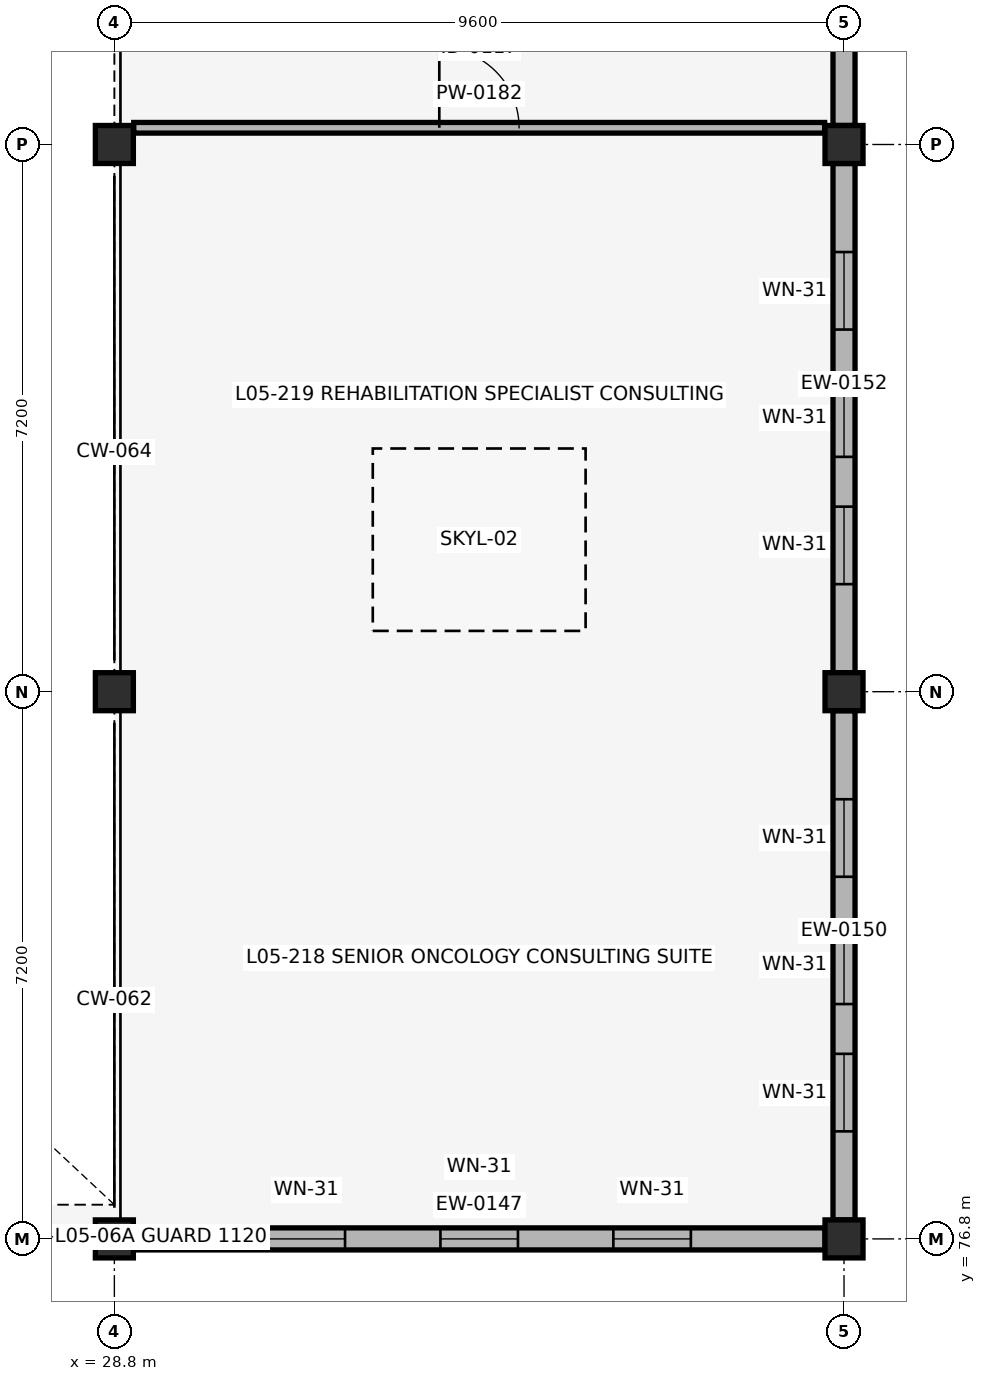
"""IFC4 building model, lengths in metres.
Left out: names, types, materials, properties, quantities, classifications, styles, units other than length and angle.
Written with IfcOpenShell. Run it as: python <this file> out.ifc"""

import sys

from ifc_helpers import new_model, si_unit, direction, frame, frame_2d, origin, origin_2d, place, context, subcontext, project, spatial, rectangle, extrude, element, fill, save


model = new_model("IFC4")
c1 = context("Model", 3, precision=1e-05, world=origin(), true_north=direction((0.0, 1.0)))
c2 = subcontext(c1, "Body", "Model", "MODEL_VIEW")
j1 = project(units=[si_unit("LENGTHUNIT", "METRE"), si_unit("PLANEANGLEUNIT", "RADIAN")], contexts=[c1])
p1 = place(None, origin())
s1 = spatial("IfcSite", under=j1, at=p1, CompositionType="ELEMENT")
p2 = place(p1, origin())
s2 = spatial("IfcBuilding", under=s1, at=p2, CompositionType="ELEMENT")
p3 = place(p2, frame((0.0, 0.0, 20.74)))
s3 = spatial("IfcBuildingStorey", under=s2, at=p3, CompositionType="ELEMENT", Elevation=20.74)
for number, where, z_axis, x_axis in (
    (1, (28.8, 76.8, 0.0), (0.0, 0.0, 1.0), (1.0, 0.0, 0.0)),
    (2, (28.8, 84.0, 0.0), (0.0, 0.0, 1.0), (1.0, 0.0, 0.0)),
    (3, (28.8, 91.2, 0.0), (0.0, 0.0, 1.0), (1.0, 0.0, 0.0)),
    (4, (38.4, 76.8, 0.0), (0.0, 0.0, 1.0), (1.0, 0.0, 0.0)),
    (5, (38.4, 84.0, 0.0), (0.0, 0.0, 1.0), (1.0, 0.0, 0.0)),
    (6, (38.4, 91.2, 0.0), (0.0, 0.0, 1.0), (1.0, 0.0, 0.0)),
):
    element("IfcColumn", number, at=place(p3, frame(where, z_axis=z_axis, x_axis=x_axis)), inside=s3, PredefinedType="COLUMN", context=c2, shape_type="SweptSolid", body=[
        extrude(rectangle(XDim=0.5, YDim=0.5, at=origin_2d()), origin(), (0.0, 0.0, 1.0), 4.08),
    ])
p4 = place(p3, frame((29.05, 76.8, 0.0), z_axis=(0.0, 0.0, 1.0), x_axis=(1.0, 0.0, 0.0)))
e7 = element("IfcWall", 7, at=p4, inside=s3, PredefinedType="SOLIDWALL", context=c2, shape_type="SweptSolid", body=[
    extrude(rectangle(XDim=9.1, YDim=0.29, at=frame_2d((4.55, 0.0))), origin(), (0.0, 0.0, 1.0), 3.07),
])
p5 = place(p4, frame((1.765, 0.0, 0.88)))
e8 = element("IfcOpeningElement", 8, at=p5, cuts=e7, PredefinedType="OPENING", context=c2, shape_type="SweptSolid", body=[
    extrude(rectangle(XDim=1.02, YDim=1.88, at=frame_2d((0.51, 0.94))), frame((0.0, 0.155, 0.0), z_axis=(0.0, -1.0, 0.0), x_axis=(1.0, 0.0, 0.0)), (0.0, 0.0, 1.0), 0.31),
])
p6 = place(p4, frame((4.04, 0.0, 0.88)))
e9 = element("IfcOpeningElement", 9, at=p6, cuts=e7, PredefinedType="OPENING", context=c2, shape_type="SweptSolid", body=[
    extrude(rectangle(XDim=1.02, YDim=1.88, at=frame_2d((0.51, 0.94))), frame((0.0, 0.155, 0.0), z_axis=(0.0, -1.0, 0.0), x_axis=(1.0, 0.0, 0.0)), (0.0, 0.0, 1.0), 0.31),
])
p7 = place(p4, frame((6.315, 0.0, 0.88)))
e10 = element("IfcOpeningElement", 10, at=p7, cuts=e7, PredefinedType="OPENING", context=c2, shape_type="SweptSolid", body=[
    extrude(rectangle(XDim=1.02, YDim=1.88, at=frame_2d((0.51, 0.94))), frame((0.0, 0.155, 0.0), z_axis=(0.0, -1.0, 0.0), x_axis=(1.0, 0.0, 0.0)), (0.0, 0.0, 1.0), 0.31),
])
p8 = place(p3, frame((38.4, 77.05, 0.0), z_axis=(0.0, 0.0, 1.0), x_axis=(0.0, 1.0, 0.0)))
e11 = element("IfcWall", 11, at=p8, inside=s3, PredefinedType="SOLIDWALL", context=c2, shape_type="SweptSolid", body=[
    extrude(rectangle(XDim=6.7, YDim=0.29, at=frame_2d((3.35, 0.0))), origin(), (0.0, 0.0, 1.0), 3.07),
])
p9 = place(p8, frame((1.165, 0.0, 0.88)))
e12 = element("IfcOpeningElement", 12, at=p9, cuts=e11, PredefinedType="OPENING", context=c2, shape_type="SweptSolid", body=[
    extrude(rectangle(XDim=1.02, YDim=1.88, at=frame_2d((0.51, 0.94))), frame((0.0, 0.155, 0.0), z_axis=(0.0, -1.0, 0.0), x_axis=(1.0, 0.0, 0.0)), (0.0, 0.0, 1.0), 0.31),
])
p10 = place(p8, frame((2.84, 0.0, 0.88)))
e13 = element("IfcOpeningElement", 13, at=p10, cuts=e11, PredefinedType="OPENING", context=c2, shape_type="SweptSolid", body=[
    extrude(rectangle(XDim=1.02, YDim=1.88, at=frame_2d((0.51, 0.94))), frame((0.0, 0.155, 0.0), z_axis=(0.0, -1.0, 0.0), x_axis=(1.0, 0.0, 0.0)), (0.0, 0.0, 1.0), 0.31),
])
p11 = place(p8, frame((4.515, 0.0, 0.88)))
e14 = element("IfcOpeningElement", 14, at=p11, cuts=e11, PredefinedType="OPENING", context=c2, shape_type="SweptSolid", body=[
    extrude(rectangle(XDim=1.02, YDim=1.88, at=frame_2d((0.51, 0.94))), frame((0.0, 0.155, 0.0), z_axis=(0.0, -1.0, 0.0), x_axis=(1.0, 0.0, 0.0)), (0.0, 0.0, 1.0), 0.31),
])
p12 = place(p3, frame((38.4, 84.25, 0.0), z_axis=(0.0, 0.0, 1.0), x_axis=(0.0, 1.0, 0.0)))
e15 = element("IfcWall", 15, at=p12, inside=s3, PredefinedType="SOLIDWALL", context=c2, shape_type="SweptSolid", body=[
    extrude(rectangle(XDim=6.7, YDim=0.29, at=frame_2d((3.35, 0.0))), origin(), (0.0, 0.0, 1.0), 3.07),
])
p13 = place(p12, frame((1.165, 0.0, 0.88)))
e16 = element("IfcOpeningElement", 16, at=p13, cuts=e15, PredefinedType="OPENING", context=c2, shape_type="SweptSolid", body=[
    extrude(rectangle(XDim=1.02, YDim=1.88, at=frame_2d((0.51, 0.94))), frame((0.0, 0.155, 0.0), z_axis=(0.0, -1.0, 0.0), x_axis=(1.0, 0.0, 0.0)), (0.0, 0.0, 1.0), 0.31),
])
p14 = place(p12, frame((2.84, 0.0, 0.88)))
e17 = element("IfcOpeningElement", 17, at=p14, cuts=e15, PredefinedType="OPENING", context=c2, shape_type="SweptSolid", body=[
    extrude(rectangle(XDim=1.02, YDim=1.88, at=frame_2d((0.51, 0.94))), frame((0.0, 0.155, 0.0), z_axis=(0.0, -1.0, 0.0), x_axis=(1.0, 0.0, 0.0)), (0.0, 0.0, 1.0), 0.31),
])
p15 = place(p12, frame((4.515, 0.0, 0.88)))
e18 = element("IfcOpeningElement", 18, at=p15, cuts=e15, PredefinedType="OPENING", context=c2, shape_type="SweptSolid", body=[
    extrude(rectangle(XDim=1.02, YDim=1.88, at=frame_2d((0.51, 0.94))), frame((0.0, 0.155, 0.0), z_axis=(0.0, -1.0, 0.0), x_axis=(1.0, 0.0, 0.0)), (0.0, 0.0, 1.0), 0.31),
])
p16 = place(p3, frame((38.4, 91.45, 0.0), z_axis=(0.0, 0.0, 1.0), x_axis=(0.0, 1.0, 0.0)))
e19 = element("IfcWall", 19, at=p16, inside=s3, PredefinedType="SOLIDWALL", context=c2, shape_type="SweptSolid", body=[
    extrude(rectangle(XDim=6.7, YDim=0.29, at=frame_2d((3.35, 0.0))), origin(), (0.0, 0.0, 1.0), 3.07),
])
p17 = place(p16, frame((1.165, 0.0, 0.88)))
e20 = element("IfcOpeningElement", 20, at=p17, cuts=e19, PredefinedType="OPENING", context=c2, shape_type="SweptSolid", body=[
    extrude(rectangle(XDim=1.02, YDim=1.88, at=frame_2d((0.51, 0.94))), frame((0.0, 0.155, 0.0), z_axis=(0.0, -1.0, 0.0), x_axis=(1.0, 0.0, 0.0)), (0.0, 0.0, 1.0), 0.31),
])
p18 = place(p16, frame((2.84, 0.0, 0.88)))
e21 = element("IfcOpeningElement", 21, at=p18, cuts=e19, PredefinedType="OPENING", context=c2, shape_type="SweptSolid", body=[
    extrude(rectangle(XDim=1.02, YDim=1.88, at=frame_2d((0.51, 0.94))), frame((0.0, 0.155, 0.0), z_axis=(0.0, -1.0, 0.0), x_axis=(1.0, 0.0, 0.0)), (0.0, 0.0, 1.0), 0.31),
])
p19 = place(p16, frame((4.515, 0.0, 0.88)))
e22 = element("IfcOpeningElement", 22, at=p19, cuts=e19, PredefinedType="OPENING", context=c2, shape_type="SweptSolid", body=[
    extrude(rectangle(XDim=1.02, YDim=1.88, at=frame_2d((0.51, 0.94))), frame((0.0, 0.155, 0.0), z_axis=(0.0, -1.0, 0.0), x_axis=(1.0, 0.0, 0.0)), (0.0, 0.0, 1.0), 0.31),
])
p20 = place(p3, frame((29.055, 91.42, 0.0), z_axis=(0.0, 0.0, 1.0), x_axis=(1.0, 0.0, 0.0)))
e23 = element("IfcWall", 23, at=p20, inside=s3, PredefinedType="PARTITIONING", context=c2, shape_type="SweptSolid", body=[
    extrude(rectangle(XDim=9.09, YDim=0.14, at=frame_2d((4.545, 0.0))), origin(), (0.0, 0.0, 1.0), 3.12),
])
p21 = place(p20, frame((4.02, 0.0, 0.0)))
e24 = element("IfcOpeningElement", 24, at=p21, cuts=e23, PredefinedType="OPENING", context=c2, shape_type="SweptSolid", body=[
    extrude(rectangle(XDim=1.05, YDim=2.1, at=frame_2d((0.525, 1.05))), frame((0.0, 0.08, 0.0), z_axis=(0.0, -1.0, 0.0), x_axis=(1.0, 0.0, 0.0)), (0.0, 0.0, 1.0), 0.16),
])
p22 = place(p5, origin())
e25 = element("IfcWindow", 25, at=p22, inside=s3, PartitioningType="SINGLE_PANEL", PredefinedType="WINDOW", context=c2, shape_type="SweptSolid", body=[
    extrude(rectangle(XDim=1.02, YDim=1.88, at=frame_2d((0.51, 0.94))), frame((0.0, 0.03, 0.0), z_axis=(0.0, -1.0, 0.0), x_axis=(1.0, 0.0, 0.0)), (0.0, 0.0, 1.0), 0.06),
])
fill(e8, e25)
p23 = place(p6, origin())
e26 = element("IfcWindow", 26, at=p23, inside=s3, PartitioningType="SINGLE_PANEL", PredefinedType="WINDOW", context=c2, shape_type="SweptSolid", body=[
    extrude(rectangle(XDim=1.02, YDim=1.88, at=frame_2d((0.51, 0.94))), frame((0.0, 0.03, 0.0), z_axis=(0.0, -1.0, 0.0), x_axis=(1.0, 0.0, 0.0)), (0.0, 0.0, 1.0), 0.06),
])
fill(e9, e26)
p24 = place(p7, origin())
e27 = element("IfcWindow", 27, at=p24, inside=s3, PartitioningType="SINGLE_PANEL", PredefinedType="WINDOW", context=c2, shape_type="SweptSolid", body=[
    extrude(rectangle(XDim=1.02, YDim=1.88, at=frame_2d((0.51, 0.94))), frame((0.0, 0.03, 0.0), z_axis=(0.0, -1.0, 0.0), x_axis=(1.0, 0.0, 0.0)), (0.0, 0.0, 1.0), 0.06),
])
fill(e10, e27)
p25 = place(p9, origin())
e28 = element("IfcWindow", 28, at=p25, inside=s3, PartitioningType="SINGLE_PANEL", PredefinedType="WINDOW", context=c2, shape_type="SweptSolid", body=[
    extrude(rectangle(XDim=1.02, YDim=1.88, at=frame_2d((0.51, 0.94))), frame((0.0, 0.03, 0.0), z_axis=(0.0, -1.0, 0.0), x_axis=(1.0, 0.0, 0.0)), (0.0, 0.0, 1.0), 0.06),
])
fill(e12, e28)
p26 = place(p10, origin())
e29 = element("IfcWindow", 29, at=p26, inside=s3, PartitioningType="SINGLE_PANEL", PredefinedType="WINDOW", context=c2, shape_type="SweptSolid", body=[
    extrude(rectangle(XDim=1.02, YDim=1.88, at=frame_2d((0.51, 0.94))), frame((0.0, 0.03, 0.0), z_axis=(0.0, -1.0, 0.0), x_axis=(1.0, 0.0, 0.0)), (0.0, 0.0, 1.0), 0.06),
])
fill(e13, e29)
p27 = place(p11, origin())
e30 = element("IfcWindow", 30, at=p27, inside=s3, PartitioningType="SINGLE_PANEL", PredefinedType="WINDOW", context=c2, shape_type="SweptSolid", body=[
    extrude(rectangle(XDim=1.02, YDim=1.88, at=frame_2d((0.51, 0.94))), frame((0.0, 0.03, 0.0), z_axis=(0.0, -1.0, 0.0), x_axis=(1.0, 0.0, 0.0)), (0.0, 0.0, 1.0), 0.06),
])
fill(e14, e30)
p28 = place(p13, origin())
e31 = element("IfcWindow", 31, at=p28, inside=s3, PartitioningType="SINGLE_PANEL", PredefinedType="WINDOW", context=c2, shape_type="SweptSolid", body=[
    extrude(rectangle(XDim=1.02, YDim=1.88, at=frame_2d((0.51, 0.94))), frame((0.0, 0.03, 0.0), z_axis=(0.0, -1.0, 0.0), x_axis=(1.0, 0.0, 0.0)), (0.0, 0.0, 1.0), 0.06),
])
fill(e16, e31)
p29 = place(p14, origin())
e32 = element("IfcWindow", 32, at=p29, inside=s3, PartitioningType="SINGLE_PANEL", PredefinedType="WINDOW", context=c2, shape_type="SweptSolid", body=[
    extrude(rectangle(XDim=1.02, YDim=1.88, at=frame_2d((0.51, 0.94))), frame((0.0, 0.03, 0.0), z_axis=(0.0, -1.0, 0.0), x_axis=(1.0, 0.0, 0.0)), (0.0, 0.0, 1.0), 0.06),
])
fill(e17, e32)
p30 = place(p15, origin())
e33 = element("IfcWindow", 33, at=p30, inside=s3, PartitioningType="SINGLE_PANEL", PredefinedType="WINDOW", context=c2, shape_type="SweptSolid", body=[
    extrude(rectangle(XDim=1.02, YDim=1.88, at=frame_2d((0.51, 0.94))), frame((0.0, 0.03, 0.0), z_axis=(0.0, -1.0, 0.0), x_axis=(1.0, 0.0, 0.0)), (0.0, 0.0, 1.0), 0.06),
])
fill(e18, e33)
p31 = place(p2, frame((0.0, 0.0, 24.82)))
p32 = place(p31, frame((0.0, 0.0, -0.29)))
p33 = place(p32, frame((33.6, 86.0, 0.0)))
p34 = place(p33, frame((0.0, 0.0, 0.24)))
e34 = element("IfcWindow", 34, at=p34, inside=s3, PartitioningType="SINGLE_PANEL", PredefinedType="SKYLIGHT", context=c2, shape_type="SweptSolid", body=[
    extrude(rectangle(XDim=2.8, YDim=2.4, at=origin_2d()), origin(), (0.0, 0.0, 1.0), 0.05),
])
p35 = place(p21, origin())
e35 = element("IfcDoor", 35, at=p35, inside=s3, OperationType="SINGLE_SWING_LEFT", PredefinedType="DOOR", context=c2, shape_type="SweptSolid", body=[
    extrude(rectangle(XDim=1.05, YDim=2.1, at=frame_2d((0.525, 1.05))), frame((0.0, 0.025, 0.0), z_axis=(0.0, -1.0, 0.0), x_axis=(1.0, 0.0, 0.0)), (0.0, 0.0, 1.0), 0.05),
])
fill(e24, e35)
save(model, sys.argv[1])
